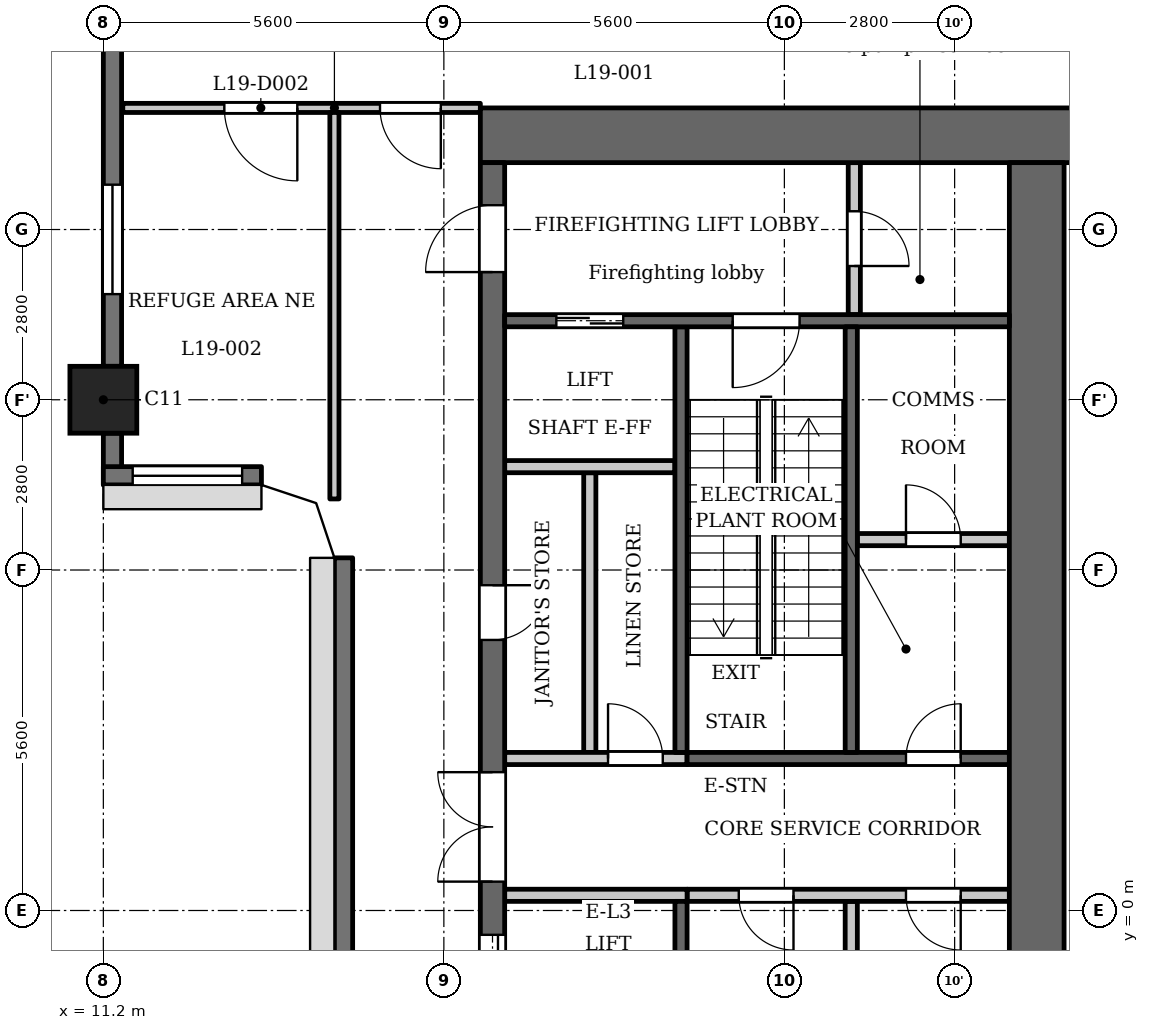
"""IFC4 building model, lengths in metres.
Left out: names, types, materials, properties, quantities, classifications, styles, units other than length and angle.
Written with IfcOpenShell. Run it as: python <this file> out.ifc"""

import sys

from ifc_helpers import new_model, si_unit, direction, frame, frame_2d, origin, origin_2d, place, context, subcontext, project, spatial, polyline, rectangle, outline, extrude, element, fill, save


model = new_model("IFC4")
c1 = context("Model", 3, precision=1e-05, world=origin(), true_north=direction((0.0, 1.0)))
c2 = subcontext(c1, "Body", "Model", "MODEL_VIEW")
j1 = project(units=[si_unit("LENGTHUNIT", "METRE"), si_unit("PLANEANGLEUNIT", "RADIAN")], contexts=[c1])
p1 = place(None, origin())
s1 = spatial("IfcSite", under=j1, at=p1, CompositionType="ELEMENT")
p2 = place(p1, origin())
s2 = spatial("IfcBuilding", under=s1, at=p2, CompositionType="ELEMENT")
p3 = place(p2, frame((0.0, 0.0, 77.9)))
s3 = spatial("IfcBuildingStorey", under=s2, at=p3, CompositionType="ELEMENT", Elevation=77.9)
p4 = place(p3, frame((11.2, 8.4, 0.0), z_axis=(0.0, 0.0, 1.0), x_axis=(1.0, 0.0, 0.0)))
e1 = element("IfcColumn", 1, at=p4, inside=s3, PredefinedType="COLUMN", context=c2, shape_type="SweptSolid", body=[
    extrude(rectangle(XDim=1.1, YDim=1.1, at=origin_2d()), origin(), (0.0, 0.0, 1.0), 5.4),
])
p5 = place(p3, frame((11.35, 14.925, 0.0), z_axis=(0.0, 0.0, 1.0), x_axis=(0.0, -1.0, 0.0)))
e2 = element("IfcWall", 2, at=p5, inside=s3, PredefinedType="SOLIDWALL", context=c2, shape_type="SweptSolid", body=[
    extrude(rectangle(XDim=5.975, YDim=0.3, at=frame_2d((2.988, 0.0))), origin(), (0.0, 0.0, 1.0), 5.1),
])
p6 = place(p5, frame((2.988, 0.0, 0.9)))
e3 = element("IfcOpeningElement", 3, at=p6, cuts=e2, PredefinedType="OPENING", context=c2, shape_type="SweptSolid", body=[
    extrude(rectangle(XDim=1.8, YDim=1.5, at=frame_2d((0.9, 0.75))), frame((0.0, 0.16, 0.0), z_axis=(0.0, -1.0, 0.0), x_axis=(1.0, 0.0, 0.0)), (0.0, 0.0, 1.0), 0.32),
])
p7 = place(p3, frame((11.35, 7.85, 0.0), z_axis=(0.0, 0.0, 1.0), x_axis=(0.0, -1.0, 0.0)))
e4 = element("IfcWall", 4, at=p7, inside=s3, PredefinedType="SOLIDWALL", context=c2, shape_type="SweptSolid", body=[
    extrude(rectangle(XDim=0.85, YDim=0.3, at=frame_2d((0.425, 0.0))), origin(), (0.0, 0.0, 1.0), 5.1),
])
p8 = place(p3, frame((11.2, 7.15, 0.0), z_axis=(0.0, 0.0, 1.0), x_axis=(1.0, 0.0, 0.0)))
e5 = element("IfcWall", 5, at=p8, inside=s3, PredefinedType="SOLIDWALL", context=c2, shape_type="SweptSolid", body=[
    extrude(rectangle(XDim=2.6, YDim=0.3, at=frame_2d((1.3, 0.0))), origin(), (0.0, 0.0, 1.0), 5.1),
])
p9 = place(p8, frame((0.482, 0.0, 0.9)))
e6 = element("IfcOpeningElement", 6, at=p9, cuts=e5, PredefinedType="OPENING", context=c2, shape_type="SweptSolid", body=[
    extrude(rectangle(XDim=1.8, YDim=1.5, at=frame_2d((0.9, 0.75))), frame((0.0, 0.16, 0.0), z_axis=(0.0, -1.0, 0.0), x_axis=(1.0, 0.0, 0.0)), (0.0, 0.0, 1.0), 0.32),
])
p10 = place(p3, frame((15.15, 5.8, 0.0), z_axis=(0.0, 0.0, 1.0), x_axis=(0.0, -1.0, 0.0)))
e7 = element("IfcWall", 7, at=p10, inside=s3, PredefinedType="SOLIDWALL", context=c2, shape_type="SweptSolid", body=[
    extrude(rectangle(XDim=11.6, YDim=0.3, at=frame_2d((5.8, 0.0))), origin(), (0.0, 0.0, 1.0), 5.1),
])
p11 = place(p3, frame((23.5, -2.5, 0.0), z_axis=(0.0, 0.0, 1.0), x_axis=(0.0, 1.0, 0.0)))
e8 = element("IfcWall", 8, at=p11, inside=s3, PredefinedType="PARTITIONING", context=c2, shape_type="SweptSolid", body=[
    extrude(rectangle(XDim=2.65, YDim=0.2, at=frame_2d((1.325, 0.0))), origin(), (0.0, 0.0, 1.0), 5.1),
])
p12 = place(p3, frame((20.7, 2.6, 0.0), z_axis=(0.0, 0.0, 1.0), x_axis=(0.0, 1.0, 0.0)))
e9 = element("IfcWall", 9, at=p12, inside=s3, PredefinedType="SHEAR", context=c2, shape_type="SweptSolid", body=[
    extrude(rectangle(XDim=7.0, YDim=0.2, at=frame_2d((3.5, 0.0))), origin(), (0.0, 0.0, 1.0), 5.1),
])
p13 = place(p3, frame((20.7, -9.6, 0.0), z_axis=(0.0, 0.0, 1.0), x_axis=(0.0, 1.0, 0.0)))
e10 = element("IfcWall", 10, at=p13, inside=s3, PredefinedType="SHEAR", context=c2, shape_type="SweptSolid", body=[
    extrude(rectangle(XDim=9.75, YDim=0.2, at=frame_2d((4.875, 0.0))), origin(), (0.0, 0.0, 1.0), 5.1),
])
p14 = place(p3, frame((20.8, 2.5, 0.0), z_axis=(0.0, 0.0, 1.0), x_axis=(1.0, 0.0, 0.0)))
e11 = element("IfcWall", 11, at=p14, inside=s3, PredefinedType="SHEAR", context=c2, shape_type="SweptSolid", body=[
    extrude(rectangle(XDim=5.3, YDim=0.2, at=frame_2d((2.65, 0.0))), origin(), (0.0, 0.0, 1.0), 5.1),
])
p15 = place(p14, frame((3.6, 0.0, 0.0)))
e12 = element("IfcOpeningElement", 12, at=p15, cuts=e11, PredefinedType="OPENING", context=c2, shape_type="SweptSolid", body=[
    extrude(rectangle(XDim=0.9, YDim=2.1, at=frame_2d((0.45, 1.05))), frame((0.0, 0.11, 0.0), z_axis=(0.0, -1.0, 0.0), x_axis=(1.0, 0.0, 0.0)), (0.0, 0.0, 1.0), 0.22),
])
p16 = place(p3, frame((20.8, 0.25, 0.0), z_axis=(0.0, 0.0, 1.0), x_axis=(1.0, 0.0, 0.0)))
e13 = element("IfcWall", 13, at=p16, inside=s3, PredefinedType="PARTITIONING", context=c2, shape_type="SweptSolid", body=[
    extrude(rectangle(XDim=5.3, YDim=0.2, at=frame_2d((2.65, 0.0))), origin(), (0.0, 0.0, 1.0), 5.1),
])
p17 = place(p16, frame((0.85, 0.0, 0.0)))
e14 = element("IfcOpeningElement", 14, at=p17, cuts=e13, PredefinedType="OPENING", context=c2, shape_type="SweptSolid", body=[
    extrude(rectangle(XDim=0.9, YDim=2.1, at=frame_2d((0.45, 1.05))), frame((0.0, 0.11, 0.0), z_axis=(0.0, -1.0, 0.0), x_axis=(1.0, 0.0, 0.0)), (0.0, 0.0, 1.0), 0.22),
])
p18 = place(p16, frame((3.6, 0.0, 0.0)))
e15 = element("IfcOpeningElement", 15, at=p18, cuts=e13, PredefinedType="OPENING", context=c2, shape_type="SweptSolid", body=[
    extrude(rectangle(XDim=0.9, YDim=2.1, at=frame_2d((0.45, 1.05))), frame((0.0, 0.11, 0.0), z_axis=(0.0, -1.0, 0.0), x_axis=(1.0, 0.0, 0.0)), (0.0, 0.0, 1.0), 0.22),
])
p19 = place(p3, frame((17.4, 12.75, 0.0), z_axis=(0.0, 0.0, 1.0), x_axis=(1.0, 0.0, 0.0)))
e16 = element("IfcWall", 16, at=p19, inside=s3, PredefinedType="SHEAR", context=c2, shape_type="SweptSolid", body=[
    extrude(rectangle(XDim=10.4, YDim=0.9, at=frame_2d((5.2, 0.0))), origin(), (0.0, 0.0, 1.0), 5.1),
])
p20 = place(p3, frame((19.2, 2.6, 0.0), z_axis=(0.0, 0.0, 1.0), x_axis=(0.0, 1.0, 0.0)))
e17 = element("IfcWall", 17, at=p20, inside=s3, PredefinedType="PARTITIONING", context=c2, shape_type="SweptSolid", body=[
    extrude(rectangle(XDim=4.6, YDim=0.2, at=frame_2d((2.3, 0.0))), origin(), (0.0, 0.0, 1.0), 5.1),
])
p21 = place(p3, frame((17.6, -12.3, 0.0), z_axis=(0.0, 0.0, 1.0), x_axis=(0.0, 1.0, 0.0)))
e18 = element("IfcWall", 18, at=p21, inside=s3, PredefinedType="SHEAR", context=c2, shape_type="SweptSolid", body=[
    extrude(rectangle(XDim=24.6, YDim=0.4, at=frame_2d((12.3, 0.0))), origin(), (0.0, 0.0, 1.0), 5.1),
])
p22 = place(p21, frame((6.0, 0.0, 0.0)))
e19 = element("IfcOpeningElement", 19, at=p22, cuts=e18, PredefinedType="OPENING", context=c2, shape_type="SweptSolid", body=[
    extrude(rectangle(XDim=1.1, YDim=2.1, at=frame_2d((0.55, 1.05))), frame((0.0, 0.21, 0.0), z_axis=(0.0, -1.0, 0.0), x_axis=(1.0, 0.0, 0.0)), (0.0, 0.0, 1.0), 0.42),
])
p23 = place(p21, frame((8.4, 0.0, 0.0)))
e20 = element("IfcOpeningElement", 20, at=p23, cuts=e18, PredefinedType="OPENING", context=c2, shape_type="SweptSolid", body=[
    extrude(rectangle(XDim=1.1, YDim=2.1, at=frame_2d((0.55, 1.05))), frame((0.0, 0.21, 0.0), z_axis=(0.0, -1.0, 0.0), x_axis=(1.0, 0.0, 0.0)), (0.0, 0.0, 1.0), 0.42),
])
p24 = place(p21, frame((10.8, 0.0, 0.0)))
e21 = element("IfcOpeningElement", 21, at=p24, cuts=e18, PredefinedType="OPENING", context=c2, shape_type="SweptSolid", body=[
    extrude(rectangle(XDim=1.1, YDim=2.1, at=frame_2d((0.55, 1.05))), frame((0.0, 0.21, 0.0), z_axis=(0.0, -1.0, 0.0), x_axis=(1.0, 0.0, 0.0)), (0.0, 0.0, 1.0), 0.42),
])
p25 = place(p21, frame((16.75, 0.0, 0.0)))
e22 = element("IfcOpeningElement", 22, at=p25, cuts=e18, PredefinedType="OPENING", context=c2, shape_type="SweptSolid", body=[
    extrude(rectangle(XDim=0.9, YDim=2.1, at=frame_2d((0.45, 1.05))), frame((0.0, 0.21, 0.0), z_axis=(0.0, -1.0, 0.0), x_axis=(1.0, 0.0, 0.0)), (0.0, 0.0, 1.0), 0.42),
])
p26 = place(p21, frame((22.8, 0.0, 0.0)))
e23 = element("IfcOpeningElement", 23, at=p26, cuts=e18, PredefinedType="OPENING", context=c2, shape_type="SweptSolid", body=[
    extrude(rectangle(XDim=1.1, YDim=2.1, at=frame_2d((0.55, 1.05))), frame((0.0, 0.21, 0.0), z_axis=(0.0, -1.0, 0.0), x_axis=(1.0, 0.0, 0.0)), (0.0, 0.0, 1.0), 0.42),
])
p27 = place(p21, frame((0.7, 0.0, 0.0)))
e24 = element("IfcOpeningElement", 24, at=p27, cuts=e18, PredefinedType="OPENING", context=c2, shape_type="SweptSolid", body=[
    extrude(rectangle(XDim=1.1, YDim=2.1, at=frame_2d((0.55, 1.05))), frame((0.0, 0.21, 0.0), z_axis=(0.0, -1.0, 0.0), x_axis=(1.0, 0.0, 0.0)), (0.0, 0.0, 1.0), 0.42),
])
p28 = place(p21, frame((12.775, 0.0, 0.0)))
e25 = element("IfcOpeningElement", 25, at=p28, cuts=e18, PredefinedType="OPENING", context=c2, shape_type="SweptSolid", body=[
    extrude(rectangle(XDim=1.8, YDim=2.1, at=frame_2d((0.9, 1.05))), frame((0.0, 0.21, 0.0), z_axis=(0.0, -1.0, 0.0), x_axis=(1.0, 0.0, 0.0)), (0.0, 0.0, 1.0), 0.42),
])
p29 = place(p3, frame((26.55, -12.3, 0.0), z_axis=(0.0, 0.0, 1.0), x_axis=(0.0, 1.0, 0.0)))
e26 = element("IfcWall", 26, at=p29, inside=s3, PredefinedType="SHEAR", context=c2, shape_type="SweptSolid", body=[
    extrude(rectangle(XDim=24.6, YDim=0.9, at=frame_2d((12.3, 0.0))), origin(), (0.0, 0.0, 1.0), 5.1),
])
p30 = place(p3, frame((23.55, 9.8, 0.0), z_axis=(0.0, 0.0, 1.0), x_axis=(0.0, 1.0, 0.0)))
e27 = element("IfcWall", 27, at=p30, inside=s3, PredefinedType="PARTITIONING", context=c2, shape_type="SweptSolid", body=[
    extrude(rectangle(XDim=2.5, YDim=0.2, at=frame_2d((1.25, 0.0))), origin(), (0.0, 0.0, 1.0), 5.1),
])
p31 = place(p30, frame((0.8, 0.0, 0.0)))
e28 = element("IfcOpeningElement", 28, at=p31, cuts=e27, PredefinedType="OPENING", context=c2, shape_type="SweptSolid", body=[
    extrude(rectangle(XDim=0.9, YDim=2.1, at=frame_2d((0.45, 1.05))), frame((0.0, 0.11, 0.0), z_axis=(0.0, -1.0, 0.0), x_axis=(1.0, 0.0, 0.0)), (0.0, 0.0, 1.0), 0.22),
])
p32 = place(p3, frame((23.6, 6.1, 0.0), z_axis=(0.0, 0.0, 1.0), x_axis=(1.0, 0.0, 0.0)))
e29 = element("IfcWall", 29, at=p32, inside=s3, PredefinedType="PARTITIONING", context=c2, shape_type="SweptSolid", body=[
    extrude(rectangle(XDim=2.5, YDim=0.2, at=frame_2d((1.25, 0.0))), origin(), (0.0, 0.0, 1.0), 5.1),
])
p33 = place(p32, frame((0.8, 0.0, 0.0)))
e30 = element("IfcOpeningElement", 30, at=p33, cuts=e29, PredefinedType="OPENING", context=c2, shape_type="SweptSolid", body=[
    extrude(rectangle(XDim=0.9, YDim=2.1, at=frame_2d((0.45, 1.05))), frame((0.0, 0.11, 0.0), z_axis=(0.0, -1.0, 0.0), x_axis=(1.0, 0.0, 0.0)), (0.0, 0.0, 1.0), 0.22),
])
p34 = place(p3, frame((17.8, 0.25, 0.0), z_axis=(0.0, 0.0, 1.0), x_axis=(1.0, 0.0, 0.0)))
e31 = element("IfcWall", 31, at=p34, inside=s3, PredefinedType="PARTITIONING", context=c2, shape_type="SweptSolid", body=[
    extrude(rectangle(XDim=3.0, YDim=0.2, at=frame_2d((1.5, 0.0))), origin(), (0.0, 0.0, 1.0), 5.1),
])
p35 = place(p3, frame((17.8, 2.5, 0.0), z_axis=(0.0, 0.0, 1.0), x_axis=(1.0, 0.0, 0.0)))
e32 = element("IfcWall", 32, at=p35, inside=s3, PredefinedType="PARTITIONING", context=c2, shape_type="SweptSolid", body=[
    extrude(rectangle(XDim=3.0, YDim=0.2, at=frame_2d((1.5, 0.0))), origin(), (0.0, 0.0, 1.0), 5.1),
])
p36 = place(p35, frame((1.7, 0.0, 0.0)))
e33 = element("IfcOpeningElement", 33, at=p36, cuts=e32, PredefinedType="OPENING", context=c2, shape_type="SweptSolid", body=[
    extrude(rectangle(XDim=0.9, YDim=2.1, at=frame_2d((0.45, 1.05))), frame((0.0, 0.11, 0.0), z_axis=(0.0, -1.0, 0.0), x_axis=(1.0, 0.0, 0.0)), (0.0, 0.0, 1.0), 0.22),
])
p37 = place(p3, frame((17.8, 7.3, 0.0), z_axis=(0.0, 0.0, 1.0), x_axis=(1.0, 0.0, 0.0)))
e34 = element("IfcWall", 34, at=p37, inside=s3, PredefinedType="PARTITIONING", context=c2, shape_type="SweptSolid", body=[
    extrude(rectangle(XDim=2.8, YDim=0.2, at=frame_2d((1.4, 0.0))), origin(), (0.0, 0.0, 1.0), 5.1),
])
p38 = place(p3, frame((17.8, 9.7, 0.0), z_axis=(0.0, 0.0, 1.0), x_axis=(1.0, 0.0, 0.0)))
e35 = element("IfcWall", 35, at=p38, inside=s3, PredefinedType="SHEAR", context=c2, shape_type="SweptSolid", body=[
    extrude(rectangle(XDim=8.3, YDim=0.2, at=frame_2d((4.15, 0.0))), origin(), (0.0, 0.0, 1.0), 5.1),
])
p39 = place(p38, frame((0.85, 0.0, 0.0)))
e36 = element("IfcOpeningElement", 36, at=p39, cuts=e35, PredefinedType="OPENING", context=c2, shape_type="SweptSolid", body=[
    extrude(rectangle(XDim=1.1, YDim=2.1, at=frame_2d((0.55, 1.05))), frame((0.0, 0.11, 0.0), z_axis=(0.0, -1.0, 0.0), x_axis=(1.0, 0.0, 0.0)), (0.0, 0.0, 1.0), 0.22),
])
p40 = place(p38, frame((3.75, 0.0, 0.0)))
e37 = element("IfcOpeningElement", 37, at=p40, cuts=e35, PredefinedType="OPENING", context=c2, shape_type="SweptSolid", body=[
    extrude(rectangle(XDim=1.1, YDim=2.1, at=frame_2d((0.55, 1.05))), frame((0.0, 0.11, 0.0), z_axis=(0.0, -1.0, 0.0), x_axis=(1.0, 0.0, 0.0)), (0.0, 0.0, 1.0), 0.22),
])
p41 = place(p3, frame((23.5, 2.6, 0.0), z_axis=(0.0, 0.0, 1.0), x_axis=(0.0, 1.0, 0.0)))
e38 = element("IfcWall", 38, at=p41, inside=s3, PredefinedType="SHEAR", context=c2, shape_type="SweptSolid", body=[
    extrude(rectangle(XDim=7.0, YDim=0.2, at=frame_2d((3.5, 0.0))), origin(), (0.0, 0.0, 1.0), 5.1),
])
p42 = place(p3, frame((11.52, 13.2, 0.0), z_axis=(0.0, 0.0, 1.0), x_axis=(1.0, 0.0, 0.0)))
e39 = element("IfcWall", 39, at=p42, inside=s3, PredefinedType="PARTITIONING", context=c2, shape_type="SweptSolid", body=[
    extrude(rectangle(XDim=5.88, YDim=0.15, at=frame_2d((2.94, 0.0))), origin(), (0.0, 0.0, 1.0), 5.1),
])
p43 = place(p42, frame((4.23, 0.0, 0.0)))
e40 = element("IfcOpeningElement", 40, at=p43, cuts=e39, PredefinedType="OPENING", context=c2, shape_type="SweptSolid", body=[
    extrude(rectangle(XDim=1.0, YDim=2.1, at=frame_2d((0.5, 1.05))), frame((0.0, 0.085, 0.0), z_axis=(0.0, -1.0, 0.0), x_axis=(1.0, 0.0, 0.0)), (0.0, 0.0, 1.0), 0.17),
])
p44 = place(p42, frame((1.67, 0.0, 0.0)))
e41 = element("IfcOpeningElement", 41, at=p44, cuts=e39, PredefinedType="OPENING", context=c2, shape_type="SweptSolid", body=[
    extrude(rectangle(XDim=1.2, YDim=2.1, at=frame_2d((0.6, 1.05))), frame((0.0, 0.085, 0.0), z_axis=(0.0, -1.0, 0.0), x_axis=(1.0, 0.0, 0.0)), (0.0, 0.0, 1.0), 0.17),
])
p45 = place(p3, frame((15.0, 6.769, 0.0), z_axis=(0.0, 0.0, 1.0), x_axis=(0.0, 1.0, 0.0)))
e42 = element("IfcWall", 42, at=p45, inside=s3, PredefinedType="PARTITIONING", context=c2, shape_type="SweptSolid", body=[
    extrude(rectangle(XDim=6.356, YDim=0.15, at=frame_2d((3.178, 0.0))), origin(), (0.0, 0.0, 1.0), 5.1),
])
p46 = place(p3, origin())
e43 = element("IfcWall", 43, at=p46, inside=s3, PredefinedType="SOLIDWALL", context=c2, shape_type="SweptSolid", body=[
    extrude(outline(polyline([(13.8, 7.0), (14.7, 6.7), (15.0, 5.8), (15.3, 5.8), (15.3, 5.849), (14.937, 6.937), (13.849, 7.3), (13.8, 7.3), (13.8, 7.0)])), origin(), (0.0, 0.0, 1.0), 5.1),
])
p47 = place(p24, origin())
e44 = element("IfcDoor", 44, at=p47, inside=s3, OperationType="DOUBLE_DOOR_SLIDING", PredefinedType="DOOR", context=c2, shape_type="SweptSolid", body=[
    extrude(rectangle(XDim=1.1, YDim=2.1, at=frame_2d((0.55, 1.05))), frame((0.0, 0.025, 0.0), z_axis=(0.0, -1.0, 0.0), x_axis=(1.0, 0.0, 0.0)), (0.0, 0.0, 1.0), 0.05),
])
fill(e21, e44)
p48 = place(p25, origin())
e45 = element("IfcDoor", 45, at=p48, inside=s3, OperationType="SINGLE_SWING_RIGHT", PredefinedType="DOOR", context=c2, shape_type="SweptSolid", body=[
    extrude(rectangle(XDim=0.9, YDim=2.1, at=frame_2d((0.45, 1.05))), frame((0.0, 0.025, 0.0), z_axis=(0.0, -1.0, 0.0), x_axis=(1.0, 0.0, 0.0)), (0.0, 0.0, 1.0), 0.05),
])
fill(e22, e45)
p49 = place(p36, origin())
e46 = element("IfcDoor", 46, at=p49, inside=s3, OperationType="SINGLE_SWING_RIGHT", PredefinedType="DOOR", context=c2, shape_type="SweptSolid", body=[
    extrude(rectangle(XDim=0.9, YDim=2.1, at=frame_2d((0.45, 1.05))), frame((0.0, 0.025, 0.0), z_axis=(0.0, -1.0, 0.0), x_axis=(1.0, 0.0, 0.0)), (0.0, 0.0, 1.0), 0.05),
])
fill(e33, e46)
p50 = place(p39, origin())
e47 = element("IfcDoor", 47, at=p50, inside=s3, OperationType="DOUBLE_DOOR_SLIDING", PredefinedType="DOOR", context=c2, shape_type="SweptSolid", body=[
    extrude(rectangle(XDim=1.1, YDim=2.1, at=frame_2d((0.55, 1.05))), frame((0.0, 0.025, 0.0), z_axis=(0.0, -1.0, 0.0), x_axis=(1.0, 0.0, 0.0)), (0.0, 0.0, 1.0), 0.05),
])
fill(e36, e47)
p51 = place(p26, origin())
e48 = element("IfcDoor", 48, at=p51, inside=s3, OperationType="SINGLE_SWING_RIGHT", PredefinedType="DOOR", context=c2, shape_type="SweptSolid", body=[
    extrude(rectangle(XDim=1.1, YDim=2.1, at=frame_2d((0.55, 1.05))), frame((0.0, 0.025, 0.0), z_axis=(0.0, -1.0, 0.0), x_axis=(1.0, 0.0, 0.0)), (0.0, 0.0, 1.0), 0.05),
])
fill(e23, e48)
p52 = place(p31, origin())
e49 = element("IfcDoor", 49, at=p52, inside=s3, OperationType="SINGLE_SWING_LEFT", PredefinedType="DOOR", context=c2, shape_type="SweptSolid", body=[
    extrude(rectangle(XDim=0.9, YDim=2.1, at=frame_2d((0.45, 1.05))), frame((0.0, 0.025, 0.0), z_axis=(0.0, -1.0, 0.0), x_axis=(1.0, 0.0, 0.0)), (0.0, 0.0, 1.0), 0.05),
])
fill(e28, e49)
p53 = place(p40, origin())
e50 = element("IfcDoor", 50, at=p53, inside=s3, OperationType="SINGLE_SWING_LEFT", PredefinedType="DOOR", context=c2, shape_type="SweptSolid", body=[
    extrude(rectangle(XDim=1.1, YDim=2.1, at=frame_2d((0.55, 1.05))), frame((0.0, 0.025, 0.0), z_axis=(0.0, -1.0, 0.0), x_axis=(1.0, 0.0, 0.0)), (0.0, 0.0, 1.0), 0.05),
])
fill(e37, e50)
p54 = place(p28, origin())
e51 = element("IfcDoor", 51, at=p54, inside=s3, OperationType="DOUBLE_DOOR_SINGLE_SWING", PredefinedType="DOOR", context=c2, shape_type="SweptSolid", body=[
    extrude(rectangle(XDim=1.8, YDim=2.1, at=frame_2d((0.9, 1.05))), frame((0.0, 0.025, 0.0), z_axis=(0.0, -1.0, 0.0), x_axis=(1.0, 0.0, 0.0)), (0.0, 0.0, 1.0), 0.05),
])
fill(e25, e51)
p55 = place(p17, origin())
e52 = element("IfcDoor", 52, at=p55, inside=s3, OperationType="SINGLE_SWING_RIGHT", PredefinedType="DOOR", context=c2, shape_type="SweptSolid", body=[
    extrude(rectangle(XDim=0.9, YDim=2.1, at=frame_2d((0.45, 1.05))), frame((0.0, 0.025, 0.0), z_axis=(0.0, -1.0, 0.0), x_axis=(1.0, 0.0, 0.0)), (0.0, 0.0, 1.0), 0.05),
])
fill(e14, e52)
p56 = place(p18, origin())
e53 = element("IfcDoor", 53, at=p56, inside=s3, OperationType="SINGLE_SWING_RIGHT", PredefinedType="DOOR", context=c2, shape_type="SweptSolid", body=[
    extrude(rectangle(XDim=0.9, YDim=2.1, at=frame_2d((0.45, 1.05))), frame((0.0, 0.025, 0.0), z_axis=(0.0, -1.0, 0.0), x_axis=(1.0, 0.0, 0.0)), (0.0, 0.0, 1.0), 0.05),
])
fill(e15, e53)
p57 = place(p33, origin())
e54 = element("IfcDoor", 54, at=p57, inside=s3, OperationType="SINGLE_SWING_RIGHT", PredefinedType="DOOR", context=c2, shape_type="SweptSolid", body=[
    extrude(rectangle(XDim=0.9, YDim=2.1, at=frame_2d((0.45, 1.05))), frame((0.0, 0.025, 0.0), z_axis=(0.0, -1.0, 0.0), x_axis=(1.0, 0.0, 0.0)), (0.0, 0.0, 1.0), 0.05),
])
fill(e30, e54)
p58 = place(p15, origin())
e55 = element("IfcDoor", 55, at=p58, inside=s3, OperationType="SINGLE_SWING_LEFT", PredefinedType="DOOR", context=c2, shape_type="SweptSolid", body=[
    extrude(rectangle(XDim=0.9, YDim=2.1, at=frame_2d((0.45, 1.05))), frame((0.0, 0.025, 0.0), z_axis=(0.0, -1.0, 0.0), x_axis=(1.0, 0.0, 0.0)), (0.0, 0.0, 1.0), 0.05),
])
fill(e12, e55)
p59 = place(p43, origin())
e56 = element("IfcDoor", 56, at=p59, inside=s3, OperationType="SINGLE_SWING_RIGHT", PredefinedType="DOOR", context=c2, shape_type="SweptSolid", body=[
    extrude(rectangle(XDim=1.0, YDim=2.1, at=frame_2d((0.5, 1.05))), frame((0.0, 0.025, 0.0), z_axis=(0.0, -1.0, 0.0), x_axis=(1.0, 0.0, 0.0)), (0.0, 0.0, 1.0), 0.05),
])
fill(e40, e56)
p60 = place(p44, origin())
e57 = element("IfcDoor", 57, at=p60, inside=s3, OperationType="SINGLE_SWING_RIGHT", PredefinedType="DOOR", context=c2, shape_type="SweptSolid", body=[
    extrude(rectangle(XDim=1.2, YDim=2.1, at=frame_2d((0.6, 1.05))), frame((0.0, 0.025, 0.0), z_axis=(0.0, -1.0, 0.0), x_axis=(1.0, 0.0, 0.0)), (0.0, 0.0, 1.0), 0.05),
])
fill(e41, e57)
p61 = place(p6, origin())
e58 = element("IfcWindow", 58, at=p61, inside=s3, PartitioningType="SINGLE_PANEL", PredefinedType="WINDOW", context=c2, shape_type="SweptSolid", body=[
    extrude(rectangle(XDim=1.8, YDim=1.5, at=frame_2d((0.9, 0.75))), frame((0.0, 0.03, 0.0), z_axis=(0.0, -1.0, 0.0), x_axis=(1.0, 0.0, 0.0)), (0.0, 0.0, 1.0), 0.06),
])
fill(e3, e58)
p62 = place(p9, origin())
e59 = element("IfcWindow", 59, at=p62, inside=s3, PartitioningType="SINGLE_PANEL", PredefinedType="WINDOW", context=c2, shape_type="SweptSolid", body=[
    extrude(rectangle(XDim=1.8, YDim=1.5, at=frame_2d((0.9, 0.75))), frame((0.0, 0.03, 0.0), z_axis=(0.0, -1.0, 0.0), x_axis=(1.0, 0.0, 0.0)), (0.0, 0.0, 1.0), 0.06),
])
fill(e6, e59)
save(model, sys.argv[1])
